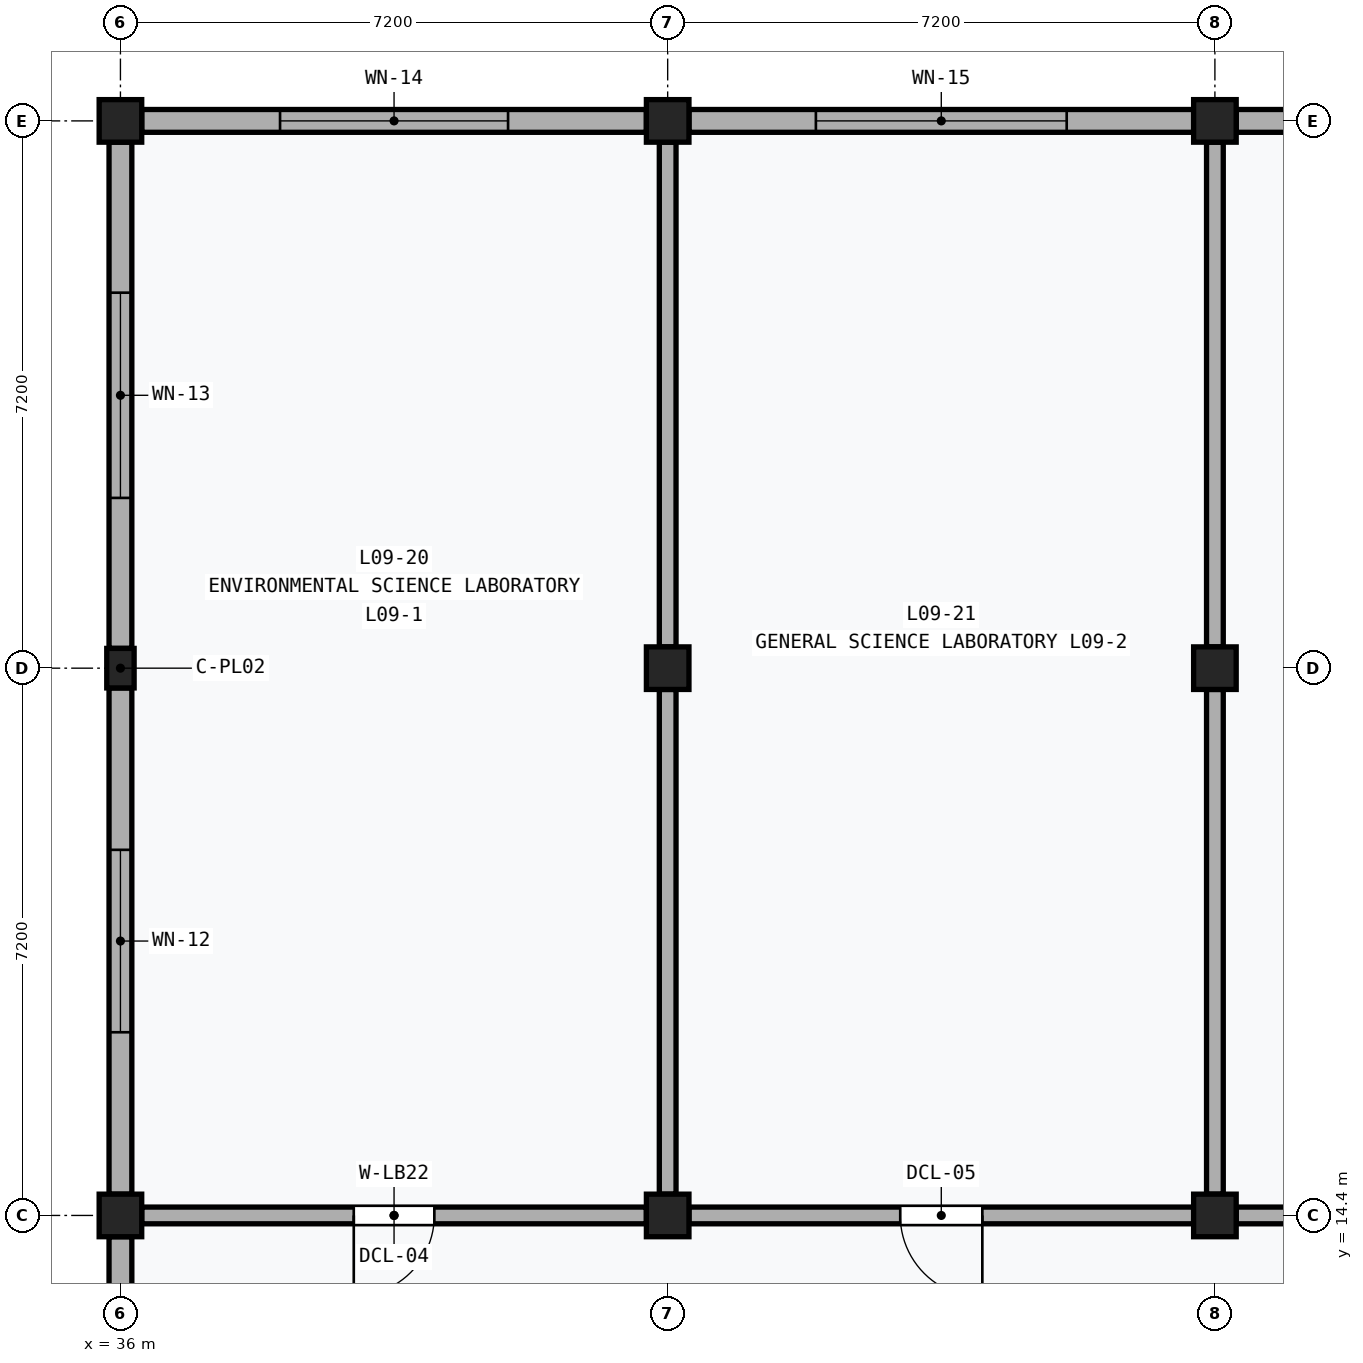
"""IFC4 building model, lengths in metres.
Left out: names, types, materials, properties, quantities, classifications, styles, units other than length and angle.
Written with IfcOpenShell. Run it as: python <this file> out.ifc"""

import sys

from ifc_helpers import new_model, si_unit, direction, frame, frame_2d, origin, origin_2d, place, context, subcontext, project, spatial, rectangle, extrude, element, fill, save


model = new_model("IFC4")
c1 = context("Model", 3, precision=1e-05, world=origin(), true_north=direction((0.0, 1.0)))
c2 = subcontext(c1, "Body", "Model", "MODEL_VIEW")
j1 = project(units=[si_unit("LENGTHUNIT", "METRE"), si_unit("PLANEANGLEUNIT", "RADIAN")], contexts=[c1])
p1 = place(None, origin())
s1 = spatial("IfcSite", under=j1, at=p1, CompositionType="ELEMENT")
p2 = place(p1, origin())
s2 = spatial("IfcBuilding", under=s1, at=p2, CompositionType="ELEMENT")
p3 = place(p2, frame((0.0, 0.0, 38.8)))
s3 = spatial("IfcBuildingStorey", under=s2, at=p3, CompositionType="ELEMENT", Elevation=38.8)
p4 = place(p3, frame((36.0, 14.4, 0.0), z_axis=(0.0, 0.0, 1.0), x_axis=(1.0, 0.0, 0.0)))
e1 = element("IfcColumn", 1, at=p4, inside=s3, PredefinedType="COLUMN", context=c2, shape_type="SweptSolid", body=[
    extrude(rectangle(XDim=0.56, YDim=0.56, at=origin_2d()), origin(), (0.0, 0.0, 1.0), 4.0),
])
p5 = place(p3, frame((36.0, 21.6, 0.0), z_axis=(0.0, 0.0, 1.0), x_axis=(1.0, 0.0, 0.0)))
e2 = element("IfcColumn", 2, at=p5, inside=s3, PredefinedType="PILASTER", context=c2, shape_type="SweptSolid", body=[
    extrude(rectangle(XDim=0.36, YDim=0.52, at=origin_2d()), origin(), (0.0, 0.0, 1.0), 4.0),
])
for number, where, z_axis, x_axis in (
    (3, (36.0, 28.8, 0.0), (0.0, 0.0, 1.0), (1.0, 0.0, 0.0)),
    (4, (43.2, 14.4, 0.0), (0.0, 0.0, 1.0), (1.0, 0.0, 0.0)),
    (5, (43.2, 21.6, 0.0), (0.0, 0.0, 1.0), (1.0, 0.0, 0.0)),
    (6, (43.2, 28.8, 0.0), (0.0, 0.0, 1.0), (1.0, 0.0, 0.0)),
    (7, (50.4, 14.4, 0.0), (0.0, 0.0, 1.0), (1.0, 0.0, 0.0)),
    (8, (50.4, 21.6, 0.0), (0.0, 0.0, 1.0), (1.0, 0.0, 0.0)),
    (9, (50.4, 28.8, 0.0), (0.0, 0.0, 1.0), (1.0, 0.0, 0.0)),
):
    element("IfcColumn", number, at=place(p3, frame(where, z_axis=z_axis, x_axis=x_axis)), inside=s3, PredefinedType="COLUMN", context=c2, shape_type="SweptSolid", body=[
        extrude(rectangle(XDim=0.56, YDim=0.56, at=origin_2d()), origin(), (0.0, 0.0, 1.0), 4.0),
    ])
p6 = place(p3, frame((36.0, 7.48, 0.0), z_axis=(0.0, 0.0, 1.0), x_axis=(0.0, 1.0, 0.0)))
e10 = element("IfcWall", 10, at=p6, inside=s3, PredefinedType="SOLIDWALL", context=c2, shape_type="SweptSolid", body=[
    extrude(rectangle(XDim=6.64, YDim=0.3, at=frame_2d((3.32, 0.0))), origin(), (0.0, 0.0, 1.0), 3.17),
])
p7 = place(p6, frame((2.27, 0.0, 0.85)))
e11 = element("IfcOpeningElement", 11, at=p7, cuts=e10, PredefinedType="OPENING", context=c2, shape_type="SweptSolid", body=[
    extrude(rectangle(XDim=2.1, YDim=2.0, at=frame_2d((1.05, 1.0))), frame((0.0, 0.162, 0.0), z_axis=(0.0, -1.0, 0.0), x_axis=(1.0, 0.0, 0.0)), (0.0, 0.0, 1.0), 0.324),
])
p8 = place(p3, frame((36.0, 14.68, 0.0), z_axis=(0.0, 0.0, 1.0), x_axis=(0.0, 1.0, 0.0)))
e12 = element("IfcWall", 12, at=p8, inside=s3, PredefinedType="SOLIDWALL", context=c2, shape_type="SweptSolid", body=[
    extrude(rectangle(XDim=6.66, YDim=0.3, at=frame_2d((3.33, 0.0))), origin(), (0.0, 0.0, 1.0), 3.17),
])
p9 = place(p8, frame((2.13, 0.0, 0.85)))
e13 = element("IfcOpeningElement", 13, at=p9, cuts=e12, PredefinedType="OPENING", context=c2, shape_type="SweptSolid", body=[
    extrude(rectangle(XDim=2.4, YDim=2.0, at=frame_2d((1.2, 1.0))), frame((0.0, 0.162, 0.0), z_axis=(0.0, -1.0, 0.0), x_axis=(1.0, 0.0, 0.0)), (0.0, 0.0, 1.0), 0.324),
])
p10 = place(p3, frame((36.28, 28.8, 0.0), z_axis=(0.0, 0.0, 1.0), x_axis=(1.0, 0.0, 0.0)))
e14 = element("IfcWall", 14, at=p10, inside=s3, PredefinedType="SOLIDWALL", context=c2, shape_type="SweptSolid", body=[
    extrude(rectangle(XDim=6.64, YDim=0.3, at=frame_2d((3.32, 0.0))), origin(), (0.0, 0.0, 1.0), 3.17),
])
p11 = place(p10, frame((1.82, 0.0, 0.85)))
e15 = element("IfcOpeningElement", 15, at=p11, cuts=e14, PredefinedType="OPENING", context=c2, shape_type="SweptSolid", body=[
    extrude(rectangle(XDim=3.0, YDim=2.0, at=frame_2d((1.5, 1.0))), frame((0.0, 0.162, 0.0), z_axis=(0.0, -1.0, 0.0), x_axis=(1.0, 0.0, 0.0)), (0.0, 0.0, 1.0), 0.324),
])
p12 = place(p3, frame((36.0, 21.86, 0.0), z_axis=(0.0, 0.0, 1.0), x_axis=(0.0, 1.0, 0.0)))
e16 = element("IfcWall", 16, at=p12, inside=s3, PredefinedType="SOLIDWALL", context=c2, shape_type="SweptSolid", body=[
    extrude(rectangle(XDim=6.66, YDim=0.3, at=frame_2d((3.33, 0.0))), origin(), (0.0, 0.0, 1.0), 3.17),
])
p13 = place(p12, frame((1.98, 0.0, 0.85)))
e17 = element("IfcOpeningElement", 17, at=p13, cuts=e16, PredefinedType="OPENING", context=c2, shape_type="SweptSolid", body=[
    extrude(rectangle(XDim=2.7, YDim=2.0, at=frame_2d((1.35, 1.0))), frame((0.0, 0.162, 0.0), z_axis=(0.0, -1.0, 0.0), x_axis=(1.0, 0.0, 0.0)), (0.0, 0.0, 1.0), 0.324),
])
p14 = place(p3, frame((43.48, 28.8, 0.0), z_axis=(0.0, 0.0, 1.0), x_axis=(1.0, 0.0, 0.0)))
e18 = element("IfcWall", 18, at=p14, inside=s3, PredefinedType="SOLIDWALL", context=c2, shape_type="SweptSolid", body=[
    extrude(rectangle(XDim=6.64, YDim=0.3, at=frame_2d((3.32, 0.0))), origin(), (0.0, 0.0, 1.0), 3.17),
])
p15 = place(p14, frame((1.67, 0.0, 0.85)))
e19 = element("IfcOpeningElement", 19, at=p15, cuts=e18, PredefinedType="OPENING", context=c2, shape_type="SweptSolid", body=[
    extrude(rectangle(XDim=3.3, YDim=2.0, at=frame_2d((1.65, 1.0))), frame((0.0, 0.162, 0.0), z_axis=(0.0, -1.0, 0.0), x_axis=(1.0, 0.0, 0.0)), (0.0, 0.0, 1.0), 0.324),
])
p16 = place(p3, frame((50.68, 28.8, 0.0), z_axis=(0.0, 0.0, 1.0), x_axis=(1.0, 0.0, 0.0)))
e20 = element("IfcWall", 20, at=p16, inside=s3, PredefinedType="SOLIDWALL", context=c2, shape_type="SweptSolid", body=[
    extrude(rectangle(XDim=6.74, YDim=0.3, at=frame_2d((3.37, 0.0))), origin(), (0.0, 0.0, 1.0), 3.17),
])
p17 = place(p16, frame((2.57, 0.0, 1.1)))
e21 = element("IfcOpeningElement", 21, at=p17, cuts=e20, PredefinedType="OPENING", context=c2, shape_type="SweptSolid", body=[
    extrude(rectangle(XDim=1.6, YDim=1.5, at=frame_2d((0.8, 0.75))), frame((0.0, 0.162, 0.0), z_axis=(0.0, -1.0, 0.0), x_axis=(1.0, 0.0, 0.0)), (0.0, 0.0, 1.0), 0.324),
])
p18 = place(p3, frame((36.28, 14.4, 0.0), z_axis=(0.0, 0.0, 1.0), x_axis=(1.0, 0.0, 0.0)))
e22 = element("IfcWall", 22, at=p18, inside=s3, PredefinedType="PARTITIONING", context=c2, shape_type="SweptSolid", body=[
    extrude(rectangle(XDim=6.64, YDim=0.22, at=frame_2d((3.32, 0.0))), origin(), (0.0, 0.0, 1.0), 3.01),
])
p19 = place(p18, frame((2.79, 0.0, 0.0)))
e23 = element("IfcOpeningElement", 23, at=p19, cuts=e22, PredefinedType="OPENING", context=c2, shape_type="SweptSolid", body=[
    extrude(rectangle(XDim=1.06, YDim=2.16, at=frame_2d((0.53, 1.08))), frame((0.0, 0.122, 0.0), z_axis=(0.0, -1.0, 0.0), x_axis=(1.0, 0.0, 0.0)), (0.0, 0.0, 1.0), 0.244),
])
for number, where, z_axis, x_axis in (
    (24, (43.2, 14.68, 0.0), (0.0, 0.0, 1.0), (0.0, 1.0, 0.0)),
    (25, (43.2, 21.88, 0.0), (0.0, 0.0, 1.0), (0.0, 1.0, 0.0)),
):
    element("IfcWall", number, at=place(p3, frame(where, z_axis=z_axis, x_axis=x_axis)), inside=s3, PredefinedType="PARTITIONING", context=c2, shape_type="SweptSolid", body=[
        extrude(rectangle(XDim=6.64, YDim=0.22, at=frame_2d((3.32, 0.0))), origin(), (0.0, 0.0, 1.0), 3.01),
    ])
p20 = place(p3, frame((43.48, 14.4, 0.0), z_axis=(0.0, 0.0, 1.0), x_axis=(1.0, 0.0, 0.0)))
e26 = element("IfcWall", 26, at=p20, inside=s3, PredefinedType="PARTITIONING", context=c2, shape_type="SweptSolid", body=[
    extrude(rectangle(XDim=6.64, YDim=0.22, at=frame_2d((3.32, 0.0))), origin(), (0.0, 0.0, 1.0), 3.01),
])
p21 = place(p20, frame((2.78, 0.0, 0.0)))
e27 = element("IfcOpeningElement", 27, at=p21, cuts=e26, PredefinedType="OPENING", context=c2, shape_type="SweptSolid", body=[
    extrude(rectangle(XDim=1.08, YDim=2.18, at=frame_2d((0.54, 1.09))), frame((0.0, 0.122, 0.0), z_axis=(0.0, -1.0, 0.0), x_axis=(1.0, 0.0, 0.0)), (0.0, 0.0, 1.0), 0.244),
])
for number, where, z_axis, x_axis in (
    (28, (50.4, 14.68, 0.0), (0.0, 0.0, 1.0), (0.0, 1.0, 0.0)),
    (29, (50.4, 21.88, 0.0), (0.0, 0.0, 1.0), (0.0, 1.0, 0.0)),
):
    element("IfcWall", number, at=place(p3, frame(where, z_axis=z_axis, x_axis=x_axis)), inside=s3, PredefinedType="PARTITIONING", context=c2, shape_type="SweptSolid", body=[
        extrude(rectangle(XDim=6.64, YDim=0.22, at=frame_2d((3.32, 0.0))), origin(), (0.0, 0.0, 1.0), 3.01),
    ])
p22 = place(p3, frame((50.68, 14.4, 0.0), z_axis=(0.0, 0.0, 1.0), x_axis=(1.0, 0.0, 0.0)))
e30 = element("IfcWall", 30, at=p22, inside=s3, PredefinedType="PARTITIONING", context=c2, shape_type="SweptSolid", body=[
    extrude(rectangle(XDim=6.64, YDim=0.22, at=frame_2d((3.32, 0.0))), origin(), (0.0, 0.0, 1.0), 3.01),
])
p23 = place(p22, frame((2.76, 0.0, 0.0)))
e31 = element("IfcOpeningElement", 31, at=p23, cuts=e30, PredefinedType="OPENING", context=c2, shape_type="SweptSolid", body=[
    extrude(rectangle(XDim=1.12, YDim=2.2, at=frame_2d((0.56, 1.1))), frame((0.0, 0.122, 0.0), z_axis=(0.0, -1.0, 0.0), x_axis=(1.0, 0.0, 0.0)), (0.0, 0.0, 1.0), 0.244),
])
p24 = place(p9, origin())
e32 = element("IfcWindow", 32, at=p24, inside=s3, PartitioningType="SINGLE_PANEL", PredefinedType="WINDOW", context=c2, shape_type="SweptSolid", body=[
    extrude(rectangle(XDim=2.4, YDim=2.0, at=frame_2d((1.2, 1.0))), frame((0.0, 0.03, 0.0), z_axis=(0.0, -1.0, 0.0), x_axis=(1.0, 0.0, 0.0)), (0.0, 0.0, 1.0), 0.06),
])
fill(e13, e32)
p25 = place(p11, origin())
e33 = element("IfcWindow", 33, at=p25, inside=s3, PartitioningType="SINGLE_PANEL", PredefinedType="WINDOW", context=c2, shape_type="SweptSolid", body=[
    extrude(rectangle(XDim=3.0, YDim=2.0, at=frame_2d((1.5, 1.0))), frame((0.0, 0.03, 0.0), z_axis=(0.0, -1.0, 0.0), x_axis=(1.0, 0.0, 0.0)), (0.0, 0.0, 1.0), 0.06),
])
fill(e15, e33)
p26 = place(p13, origin())
e34 = element("IfcWindow", 34, at=p26, inside=s3, PartitioningType="SINGLE_PANEL", PredefinedType="WINDOW", context=c2, shape_type="SweptSolid", body=[
    extrude(rectangle(XDim=2.7, YDim=2.0, at=frame_2d((1.35, 1.0))), frame((0.0, 0.03, 0.0), z_axis=(0.0, -1.0, 0.0), x_axis=(1.0, 0.0, 0.0)), (0.0, 0.0, 1.0), 0.06),
])
fill(e17, e34)
p27 = place(p15, origin())
e35 = element("IfcWindow", 35, at=p27, inside=s3, PartitioningType="SINGLE_PANEL", PredefinedType="WINDOW", context=c2, shape_type="SweptSolid", body=[
    extrude(rectangle(XDim=3.3, YDim=2.0, at=frame_2d((1.65, 1.0))), frame((0.0, 0.03, 0.0), z_axis=(0.0, -1.0, 0.0), x_axis=(1.0, 0.0, 0.0)), (0.0, 0.0, 1.0), 0.06),
])
fill(e19, e35)
p28 = place(p19, frame((1.06, 0.0, 0.0), z_axis=(0.0, 0.0, 1.0), x_axis=(-1.0, 0.0, 0.0)))
e36 = element("IfcDoor", 36, at=p28, inside=s3, OperationType="SINGLE_SWING_RIGHT", PredefinedType="DOOR", context=c2, shape_type="SweptSolid", body=[
    extrude(rectangle(XDim=1.06, YDim=2.16, at=frame_2d((0.53, 1.08))), frame((0.0, 0.025, 0.0), z_axis=(0.0, -1.0, 0.0), x_axis=(1.0, 0.0, 0.0)), (0.0, 0.0, 1.0), 0.05),
])
fill(e23, e36)
p29 = place(p21, frame((1.08, 0.0, 0.0), z_axis=(0.0, 0.0, 1.0), x_axis=(-1.0, 0.0, 0.0)))
e37 = element("IfcDoor", 37, at=p29, inside=s3, OperationType="SINGLE_SWING_LEFT", PredefinedType="DOOR", context=c2, shape_type="SweptSolid", body=[
    extrude(rectangle(XDim=1.08, YDim=2.18, at=frame_2d((0.54, 1.09))), frame((0.0, 0.025, 0.0), z_axis=(0.0, -1.0, 0.0), x_axis=(1.0, 0.0, 0.0)), (0.0, 0.0, 1.0), 0.05),
])
fill(e27, e37)
save(model, sys.argv[1])
